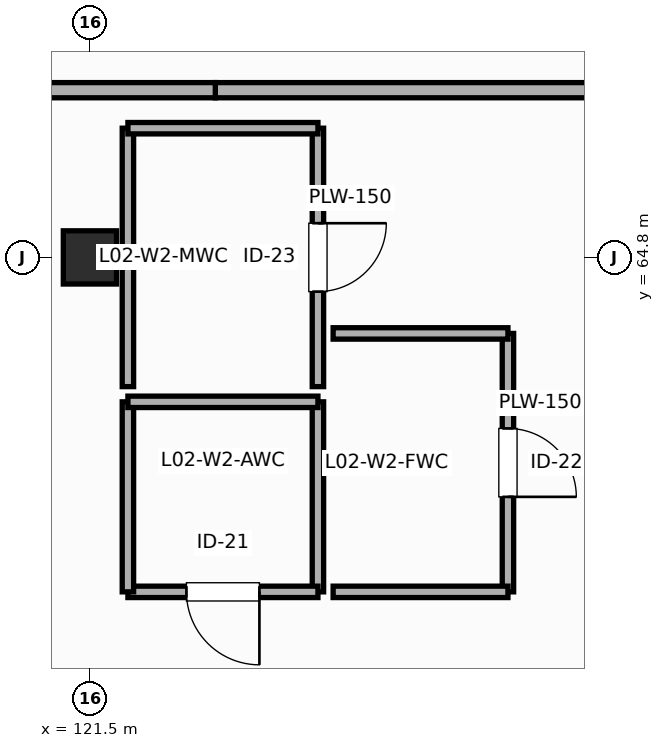
"""IFC4 building model, lengths in metres.
Left out: names, types, materials, properties, quantities, classifications, styles, units other than length and angle.
Written with IfcOpenShell. Run it as: python <this file> out.ifc"""

import sys

from ifc_helpers import new_model, si_unit, direction, frame, frame_2d, origin, origin_2d, place, context, subcontext, project, spatial, rectangle, extrude, element, fill, save


model = new_model("IFC4")
c1 = context("Model", 3, precision=1e-05, world=origin(), true_north=direction((0.0, 1.0)))
c2 = subcontext(c1, "Body", "Model", "MODEL_VIEW")
j1 = project(units=[si_unit("LENGTHUNIT", "METRE"), si_unit("PLANEANGLEUNIT", "RADIAN")], contexts=[c1])
p1 = place(None, origin())
s1 = spatial("IfcSite", under=j1, at=p1, CompositionType="ELEMENT")
p2 = place(p1, origin())
s2 = spatial("IfcBuilding", under=s1, at=p2, CompositionType="ELEMENT")
p3 = place(p2, frame((0.0, 0.0, 10.2)))
s3 = spatial("IfcBuildingStorey", under=s2, at=p3, CompositionType="ELEMENT", Elevation=10.2)
p4 = place(p3, frame((121.5, 64.8, 0.0), z_axis=(0.0, 0.0, 1.0), x_axis=(1.0, 0.0, 0.0)))
e1 = element("IfcColumn", 1, at=p4, inside=s3, PredefinedType="COLUMN", context=c2, shape_type="SweptSolid", body=[
    extrude(rectangle(XDim=0.7, YDim=0.7, at=origin_2d()), origin(), (0.0, 0.0, 1.0), 4.8),
])
p5 = place(p3, frame((124.5, 62.9, 0.0), z_axis=(0.0, 0.0, 1.0), x_axis=(0.0, -1.0, 0.0)))
e2 = element("IfcWall", 2, at=p5, inside=s3, PredefinedType="PLUMBINGWALL", context=c2, shape_type="SweptSolid", body=[
    extrude(rectangle(XDim=2.5, YDim=0.15, at=frame_2d((1.25, 0.0))), origin(), (0.0, 0.0, 1.0), 4.52),
])
p6 = place(p3, frame((124.5, 60.4, 0.0), z_axis=(0.0, 0.0, 1.0), x_axis=(-1.0, 0.0, 0.0)))
e3 = element("IfcWall", 3, at=p6, inside=s3, PredefinedType="PLUMBINGWALL", context=c2, shape_type="SweptSolid", body=[
    extrude(rectangle(XDim=2.5, YDim=0.15, at=frame_2d((1.25, 0.0))), origin(), (0.0, 0.0, 1.0), 4.52),
])
p7 = place(p6, frame((0.77, 0.0, 0.0)))
e4 = element("IfcOpeningElement", 4, at=p7, cuts=e3, PredefinedType="OPENING", context=c2, shape_type="SweptSolid", body=[
    extrude(rectangle(XDim=0.96, YDim=2.16, at=frame_2d((0.48, 1.08))), frame((0.0, 0.085, 0.0), z_axis=(0.0, -1.0, 0.0), x_axis=(1.0, 0.0, 0.0)), (0.0, 0.0, 1.0), 0.17),
])
for number, where, z_axis, x_axis in (
    (5, (122.0, 60.4, 0.0), (0.0, 0.0, 1.0), (0.0, 1.0, 0.0)),
    (6, (122.0, 62.9, 0.0), (0.0, 0.0, 1.0), (1.0, 0.0, 0.0)),
):
    element("IfcWall", number, at=place(p3, frame(where, z_axis=z_axis, x_axis=x_axis)), inside=s3, PredefinedType="PLUMBINGWALL", context=c2, shape_type="SweptSolid", body=[
        extrude(rectangle(XDim=2.5, YDim=0.15, at=frame_2d((1.25, 0.0))), origin(), (0.0, 0.0, 1.0), 4.52),
    ])
p8 = place(p3, frame((127.0, 63.8, 0.0), z_axis=(0.0, 0.0, 1.0), x_axis=(0.0, -1.0, 0.0)))
e7 = element("IfcWall", 7, at=p8, inside=s3, PredefinedType="PLUMBINGWALL", context=c2, shape_type="SweptSolid", body=[
    extrude(rectangle(XDim=3.4, YDim=0.15, at=frame_2d((1.7, 0.0))), origin(), (0.0, 0.0, 1.0), 4.52),
])
p9 = place(p8, frame((1.25, 0.0, 0.0)))
e8 = element("IfcOpeningElement", 8, at=p9, cuts=e7, PredefinedType="OPENING", context=c2, shape_type="SweptSolid", body=[
    extrude(rectangle(XDim=0.9, YDim=2.1, at=frame_2d((0.45, 1.05))), frame((0.0, 0.085, 0.0), z_axis=(0.0, -1.0, 0.0), x_axis=(1.0, 0.0, 0.0)), (0.0, 0.0, 1.0), 0.17),
])
for number, where, z_axis, x_axis in (
    (9, (127.0, 60.4, 0.0), (0.0, 0.0, 1.0), (-1.0, 0.0, 0.0)),
    (10, (124.7, 63.8, 0.0), (0.0, 0.0, 1.0), (1.0, 0.0, 0.0)),
):
    element("IfcWall", number, at=place(p3, frame(where, z_axis=z_axis, x_axis=x_axis)), inside=s3, PredefinedType="PLUMBINGWALL", context=c2, shape_type="SweptSolid", body=[
        extrude(rectangle(XDim=2.3, YDim=0.15, at=frame_2d((1.15, 0.0))), origin(), (0.0, 0.0, 1.0), 4.52),
    ])
p10 = place(p3, frame((124.5, 66.5, 0.0), z_axis=(0.0, 0.0, 1.0), x_axis=(0.0, -1.0, 0.0)))
e11 = element("IfcWall", 11, at=p10, inside=s3, PredefinedType="PLUMBINGWALL", context=c2, shape_type="SweptSolid", body=[
    extrude(rectangle(XDim=3.4, YDim=0.15, at=frame_2d((1.7, 0.0))), origin(), (0.0, 0.0, 1.0), 4.52),
])
p11 = place(p10, frame((1.25, 0.0, 0.0)))
e12 = element("IfcOpeningElement", 12, at=p11, cuts=e11, PredefinedType="OPENING", context=c2, shape_type="SweptSolid", body=[
    extrude(rectangle(XDim=0.9, YDim=2.2, at=frame_2d((0.45, 1.1))), frame((0.0, 0.085, 0.0), z_axis=(0.0, -1.0, 0.0), x_axis=(1.0, 0.0, 0.0)), (0.0, 0.0, 1.0), 0.17),
])
p12 = place(p3, frame((122.0, 63.1, 0.0), z_axis=(0.0, 0.0, 1.0), x_axis=(0.0, 1.0, 0.0)))
e13 = element("IfcWall", 13, at=p12, inside=s3, PredefinedType="PLUMBINGWALL", context=c2, shape_type="SweptSolid", body=[
    extrude(rectangle(XDim=3.4, YDim=0.15, at=frame_2d((1.7, 0.0))), origin(), (0.0, 0.0, 1.0), 4.52),
])
p13 = place(p3, frame((122.0, 66.5, 0.0), z_axis=(0.0, 0.0, 1.0), x_axis=(1.0, 0.0, 0.0)))
e14 = element("IfcWall", 14, at=p13, inside=s3, PredefinedType="PLUMBINGWALL", context=c2, shape_type="SweptSolid", body=[
    extrude(rectangle(XDim=2.5, YDim=0.15, at=frame_2d((1.25, 0.0))), origin(), (0.0, 0.0, 1.0), 4.52),
])
p14 = place(p3, frame((129.8, 67.0, 0.0), z_axis=(0.0, 0.0, 1.0), x_axis=(-1.0, 0.0, 0.0)))
e15 = element("IfcWall", 15, at=p14, inside=s3, PredefinedType="PARTITIONING", context=c2, shape_type="SweptSolid", body=[
    extrude(rectangle(XDim=6.65, YDim=0.2, at=frame_2d((3.325, 0.0))), origin(), (0.0, 0.0, 1.0), 4.52),
])
p15 = place(p3, frame((123.15, 67.0, 0.0), z_axis=(0.0, 0.0, 1.0), x_axis=(-1.0, 0.0, 0.0)))
e16 = element("IfcWall", 16, at=p15, inside=s3, PredefinedType="PARTITIONING", context=c2, shape_type="SweptSolid", body=[
    extrude(rectangle(XDim=6.65, YDim=0.2, at=frame_2d((3.325, 0.0))), origin(), (0.0, 0.0, 1.0), 4.52),
])
p16 = place(p7, origin())
e17 = element("IfcDoor", 17, at=p16, inside=s3, OperationType="SINGLE_SWING_LEFT", PredefinedType="DOOR", context=c2, shape_type="SweptSolid", body=[
    extrude(rectangle(XDim=0.96, YDim=2.16, at=frame_2d((0.48, 1.08))), frame((0.0, 0.025, 0.0), z_axis=(0.0, -1.0, 0.0), x_axis=(1.0, 0.0, 0.0)), (0.0, 0.0, 1.0), 0.05),
])
fill(e4, e17)
p17 = place(p9, origin())
e18 = element("IfcDoor", 18, at=p17, inside=s3, OperationType="SINGLE_SWING_RIGHT", PredefinedType="DOOR", context=c2, shape_type="SweptSolid", body=[
    extrude(rectangle(XDim=0.9, YDim=2.1, at=frame_2d((0.45, 1.05))), frame((0.0, 0.025, 0.0), z_axis=(0.0, -1.0, 0.0), x_axis=(1.0, 0.0, 0.0)), (0.0, 0.0, 1.0), 0.05),
])
fill(e8, e18)
p18 = place(p11, origin())
e19 = element("IfcDoor", 19, at=p18, inside=s3, OperationType="SINGLE_SWING_LEFT", PredefinedType="DOOR", context=c2, shape_type="SweptSolid", body=[
    extrude(rectangle(XDim=0.9, YDim=2.2, at=frame_2d((0.45, 1.1))), frame((0.0, 0.025, 0.0), z_axis=(0.0, -1.0, 0.0), x_axis=(1.0, 0.0, 0.0)), (0.0, 0.0, 1.0), 0.05),
])
fill(e12, e19)
save(model, sys.argv[1])
